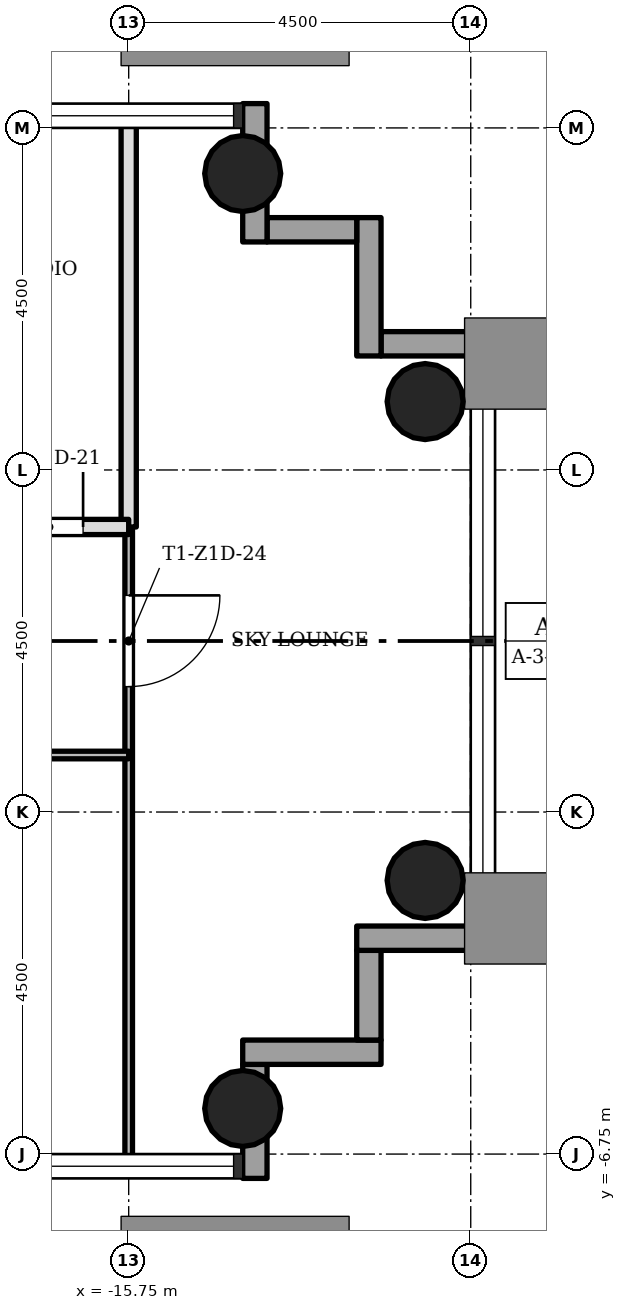
"""IFC4 building model, lengths in metres.
Left out: names, types, materials, properties, quantities, classifications, styles, units other than length and angle.
Written with IfcOpenShell. Run it as: python <this file> out.ifc"""

import sys

from ifc_helpers import new_model, si_unit, direction, frame, frame_2d, origin, origin_2d, place, context, subcontext, project, spatial, rectangle, hollow_circle, extrude, element, fill, save


model = new_model("IFC4")
c1 = context("Model", 3, precision=1e-05, world=origin(), true_north=direction((0.0, 1.0)))
c2 = subcontext(c1, "Body", "Model", "MODEL_VIEW")
j1 = project(units=[si_unit("LENGTHUNIT", "METRE"), si_unit("PLANEANGLEUNIT", "RADIAN")], contexts=[c1])
p1 = place(None, origin())
s1 = spatial("IfcSite", under=j1, at=p1, CompositionType="ELEMENT")
p2 = place(p1, origin())
s2 = spatial("IfcBuilding", under=s1, at=p2, CompositionType="ELEMENT")
p3 = place(p2, frame((0.0, 0.0, 58.5)))
s3 = spatial("IfcBuildingStorey", under=s2, at=p3, CompositionType="ELEMENT", Elevation=58.5)
for number, where, z_axis, x_axis in (
    (1, (-14.25, -6.15, 0.0), (0.0, 0.0, 1.0), (1.0, 0.0, 0.0)),
    (2, (-14.25, 6.15, 0.0), (0.0, 0.0, 1.0), (1.0, 0.0, 0.0)),
    (3, (-11.85, -3.15, 0.0), (0.0, 0.0, 1.0), (1.0, 0.0, 0.0)),
    (4, (-11.85, 3.15, 0.0), (0.0, 0.0, 1.0), (1.0, 0.0, 0.0)),
):
    element("IfcColumn", number, at=place(p3, frame(where, z_axis=z_axis, x_axis=x_axis)), inside=s3, PredefinedType="COLUMN", context=c2, shape_type="SweptSolid", body=[
        extrude(hollow_circle(Radius=0.5, WallThickness=0.036, at=origin_2d()), origin(), (0.0, 0.0, 1.0), 3.4),
    ])
p4 = place(p3, frame((-14.09, -7.07, -0.3), z_axis=(0.0, 0.0, 1.0), x_axis=(0.0, 1.0, 0.0)))
e5 = element("IfcWall", 5, at=p4, inside=s3, PredefinedType="STANDARD", context=c2, shape_type="SweptSolid", body=[
    extrude(rectangle(XDim=1.5, YDim=0.32, at=frame_2d((0.75, 0.0))), origin(), (0.0, 0.0, 1.0), 3.4),
])
p5 = place(p3, frame((-14.25, -5.41, -0.3), z_axis=(0.0, 0.0, 1.0), x_axis=(1.0, 0.0, 0.0)))
e6 = element("IfcWall", 6, at=p5, inside=s3, PredefinedType="STANDARD", context=c2, shape_type="SweptSolid", body=[
    extrude(rectangle(XDim=1.82, YDim=0.32, at=frame_2d((0.91, 0.0))), origin(), (0.0, 0.0, 1.0), 3.4),
])
p6 = place(p3, frame((-12.59, -5.25, -0.3), z_axis=(0.0, 0.0, 1.0), x_axis=(0.0, 1.0, 0.0)))
e7 = element("IfcWall", 7, at=p6, inside=s3, PredefinedType="STANDARD", context=c2, shape_type="SweptSolid", body=[
    extrude(rectangle(XDim=1.18, YDim=0.32, at=frame_2d((0.59, 0.0))), origin(), (0.0, 0.0, 1.0), 3.4),
])
p7 = place(p3, frame((-12.75, -3.91, -0.3), z_axis=(0.0, 0.0, 1.0), x_axis=(1.0, 0.0, 0.0)))
e8 = element("IfcWall", 8, at=p7, inside=s3, PredefinedType="STANDARD", context=c2, shape_type="SweptSolid", body=[
    extrude(rectangle(XDim=1.82, YDim=0.32, at=frame_2d((0.91, 0.0))), origin(), (0.0, 0.0, 1.0), 3.4),
])
p8 = place(p3, frame((-10.93, 3.91, -0.3), z_axis=(0.0, 0.0, 1.0), x_axis=(-1.0, 0.0, 0.0)))
e9 = element("IfcWall", 9, at=p8, inside=s3, PredefinedType="STANDARD", context=c2, shape_type="SweptSolid", body=[
    extrude(rectangle(XDim=1.5, YDim=0.32, at=frame_2d((0.75, 0.0))), origin(), (0.0, 0.0, 1.0), 3.4),
])
p9 = place(p3, frame((-12.59, 3.75, -0.3), z_axis=(0.0, 0.0, 1.0), x_axis=(0.0, 1.0, 0.0)))
e10 = element("IfcWall", 10, at=p9, inside=s3, PredefinedType="STANDARD", context=c2, shape_type="SweptSolid", body=[
    extrude(rectangle(XDim=1.82, YDim=0.32, at=frame_2d((0.91, 0.0))), origin(), (0.0, 0.0, 1.0), 3.4),
])
p10 = place(p3, frame((-12.75, 5.41, -0.3), z_axis=(0.0, 0.0, 1.0), x_axis=(-1.0, 0.0, 0.0)))
e11 = element("IfcWall", 11, at=p10, inside=s3, PredefinedType="STANDARD", context=c2, shape_type="SweptSolid", body=[
    extrude(rectangle(XDim=1.18, YDim=0.32, at=frame_2d((0.59, 0.0))), origin(), (0.0, 0.0, 1.0), 3.4),
])
p11 = place(p3, frame((-14.09, 5.25, -0.3), z_axis=(0.0, 0.0, 1.0), x_axis=(0.0, 1.0, 0.0)))
e12 = element("IfcWall", 12, at=p11, inside=s3, PredefinedType="STANDARD", context=c2, shape_type="SweptSolid", body=[
    extrude(rectangle(XDim=1.82, YDim=0.32, at=frame_2d((0.91, 0.0))), origin(), (0.0, 0.0, 1.0), 3.4),
])
p12 = place(p3, frame((-15.75, -6.85, 0.0), z_axis=(0.0, 0.0, 1.0), x_axis=(0.0, 1.0, 0.0)))
e13 = element("IfcWall", 13, at=p12, inside=s3, PredefinedType="PARTITIONING", context=c2, shape_type="SweptSolid", body=[
    extrude(rectangle(XDim=8.35, YDim=0.1, at=frame_2d((4.175, 0.0))), origin(), (0.0, 0.0, 1.0), 3.0),
])
p13 = place(p12, frame((6.25, 0.0, 0.0)))
e14 = element("IfcOpeningElement", 14, at=p13, cuts=e13, PredefinedType="OPENING", context=c2, shape_type="SweptSolid", body=[
    extrude(rectangle(XDim=1.2, YDim=2.1, at=frame_2d((0.6, 1.05))), frame((0.0, 0.06, 0.0), z_axis=(0.0, -1.0, 0.0), x_axis=(1.0, 0.0, 0.0)), (0.0, 0.0, 1.0), 0.12),
])
p14 = place(p3, frame((-15.75, 1.5, 0.0), z_axis=(0.0, 0.0, 1.0), x_axis=(0.0, 1.0, 0.0)))
e15 = element("IfcWall", 15, at=p14, inside=s3, PredefinedType="SOLIDWALL", context=c2, shape_type="SweptSolid", body=[
    extrude(rectangle(XDim=5.35, YDim=0.2, at=frame_2d((2.675, 0.0))), origin(), (0.0, 0.0, 1.0), 3.0),
])
p15 = place(p3, frame((-20.25, -1.5, 0.0), z_axis=(0.0, 0.0, 1.0), x_axis=(1.0, 0.0, 0.0)))
e16 = element("IfcWall", 16, at=p15, inside=s3, PredefinedType="PARTITIONING", context=c2, shape_type="SweptSolid", body=[
    extrude(rectangle(XDim=4.5, YDim=0.1, at=frame_2d((2.25, 0.0))), origin(), (0.0, 0.0, 1.0), 3.0),
])
p16 = place(p15, frame((1.8, 0.0, 0.0)))
e17 = element("IfcOpeningElement", 17, at=p16, cuts=e16, PredefinedType="OPENING", context=c2, shape_type="SweptSolid", body=[
    extrude(rectangle(XDim=0.9, YDim=2.1, at=frame_2d((0.45, 1.05))), frame((0.0, 0.06, 0.0), z_axis=(0.0, -1.0, 0.0), x_axis=(1.0, 0.0, 0.0)), (0.0, 0.0, 1.0), 0.12),
])
p17 = place(p3, frame((-20.25, 1.5, 0.0), z_axis=(0.0, 0.0, 1.0), x_axis=(1.0, 0.0, 0.0)))
e18 = element("IfcWall", 18, at=p17, inside=s3, PredefinedType="SOLIDWALL", context=c2, shape_type="SweptSolid", body=[
    extrude(rectangle(XDim=4.5, YDim=0.2, at=frame_2d((2.25, 0.0))), origin(), (0.0, 0.0, 1.0), 3.0),
])
p18 = place(p17, frame((3.0, 0.0, 0.0)))
e19 = element("IfcOpeningElement", 19, at=p18, cuts=e18, PredefinedType="OPENING", context=c2, shape_type="SweptSolid", body=[
    extrude(rectangle(XDim=0.9, YDim=2.1, at=frame_2d((0.45, 1.05))), frame((0.0, 0.11, 0.0), z_axis=(0.0, -1.0, 0.0), x_axis=(1.0, 0.0, 0.0)), (0.0, 0.0, 1.0), 0.22),
])
p19 = place(p18, origin())
e20 = element("IfcDoor", 20, at=p19, inside=s3, OperationType="SINGLE_SWING_LEFT", PredefinedType="DOOR", context=c2, shape_type="SweptSolid", body=[
    extrude(rectangle(XDim=0.9, YDim=2.1, at=frame_2d((0.45, 1.05))), frame((0.0, 0.025, 0.0), z_axis=(0.0, -1.0, 0.0), x_axis=(1.0, 0.0, 0.0)), (0.0, 0.0, 1.0), 0.05),
])
fill(e19, e20)
p20 = place(p13, origin())
e21 = element("IfcDoor", 21, at=p20, inside=s3, OperationType="SINGLE_SWING_RIGHT", PredefinedType="DOOR", context=c2, shape_type="SweptSolid", body=[
    extrude(rectangle(XDim=1.2, YDim=2.1, at=frame_2d((0.6, 1.05))), frame((0.0, 0.025, 0.0), z_axis=(0.0, -1.0, 0.0), x_axis=(1.0, 0.0, 0.0)), (0.0, 0.0, 1.0), 0.05),
])
fill(e14, e21)
save(model, sys.argv[1])
